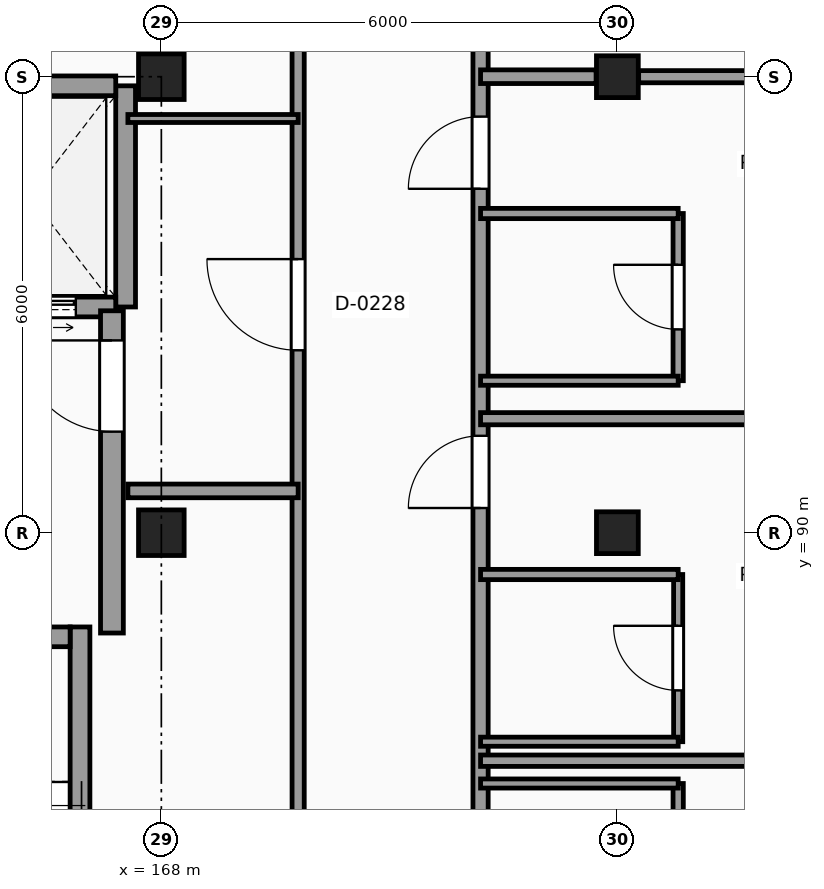
"""IFC4 building model, lengths in metres.
Left out: names, types, materials, properties, quantities, classifications, styles, units other than length and angle.
Written with IfcOpenShell. Run it as: python <this file> out.ifc"""

import sys

from ifc_helpers import new_model, si_unit, direction, frame, frame_2d, origin, origin_2d, place, context, subcontext, project, spatial, rectangle, extrude, element, fill, save


model = new_model("IFC4")
c1 = context("Model", 3, precision=1e-05, world=origin(), true_north=direction((0.0, 1.0)))
c2 = subcontext(c1, "Body", "Model", "MODEL_VIEW")
j1 = project(units=[si_unit("LENGTHUNIT", "METRE"), si_unit("PLANEANGLEUNIT", "RADIAN")], contexts=[c1])
p1 = place(None, origin())
s1 = spatial("IfcSite", under=j1, at=p1, CompositionType="ELEMENT")
p2 = place(p1, origin())
s2 = spatial("IfcBuilding", under=s1, at=p2, CompositionType="ELEMENT")
p3 = place(p2, frame((0.0, 0.0, 28.2)))
s3 = spatial("IfcBuildingStorey", under=s2, at=p3, CompositionType="ELEMENT", Elevation=28.2)
for number, where, z_axis, x_axis in (
    (1, (168.0, 90.0, 0.0), (0.0, 0.0, 1.0), (1.0, 0.0, 0.0)),
    (2, (168.0, 96.0, 0.0), (0.0, 0.0, 1.0), (1.0, 0.0, 0.0)),
):
    element("IfcColumn", number, at=place(p3, frame(where, z_axis=z_axis, x_axis=x_axis)), inside=s3, PredefinedType="COLUMN", context=c2, shape_type="SweptSolid", body=[
        extrude(rectangle(XDim=0.6, YDim=0.6, at=origin_2d()), origin(), (0.0, 0.0, 1.0), 3.3),
    ])
for number, where, z_axis, x_axis in (
    (3, (174.0, 90.0, 0.0), (0.0, 0.0, 1.0), (1.0, 0.0, 0.0)),
    (4, (174.0, 96.0, 0.0), (0.0, 0.0, 1.0), (1.0, 0.0, 0.0)),
):
    element("IfcColumn", number, at=place(p3, frame(where, z_axis=z_axis, x_axis=x_axis)), inside=s3, PredefinedType="COLUMN", context=c2, shape_type="SweptSolid", body=[
        extrude(rectangle(XDim=0.55, YDim=0.55, at=origin_2d()), origin(), (0.0, 0.0, 1.0), 3.3),
    ])
p4 = place(p3, frame((166.93, 78.04, 0.0), z_axis=(0.0, 0.0, 1.0), x_axis=(0.0, 1.0, 0.0)))
e5 = element("IfcWall", 5, at=p4, inside=s3, PredefinedType="SHEAR", context=c2, shape_type="SweptSolid", body=[
    extrude(rectangle(XDim=10.72, YDim=0.26, at=frame_2d((5.36, 0.0))), origin(), (0.0, 0.0, 1.0), 3.3),
])
p5 = place(p3, frame((163.2, 88.63, 0.0), z_axis=(0.0, 0.0, 1.0), x_axis=(1.0, 0.0, 0.0)))
e6 = element("IfcWall", 6, at=p5, inside=s3, PredefinedType="SHEAR", context=c2, shape_type="SweptSolid", body=[
    extrude(rectangle(XDim=3.6, YDim=0.26, at=frame_2d((1.8, 0.0))), origin(), (0.0, 0.0, 1.0), 3.3),
])
p6 = place(p5, frame((1.25, 0.0, 0.0)))
e7 = element("IfcOpeningElement", 7, at=p6, cuts=e6, PredefinedType="OPENING", context=c2, shape_type="SweptSolid", body=[
    extrude(rectangle(XDim=1.1, YDim=2.15, at=frame_2d((0.55, 1.075))), frame((0.0, 0.14, 0.0), z_axis=(0.0, -1.0, 0.0), x_axis=(1.0, 0.0, 0.0)), (0.0, 0.0, 1.0), 0.28),
])
p7 = place(p3, frame((167.53, 92.97, 0.0), z_axis=(0.0, 0.0, 1.0), x_axis=(0.0, 1.0, 0.0)))
e8 = element("IfcWall", 8, at=p7, inside=s3, PredefinedType="SHEAR", context=c2, shape_type="SweptSolid", body=[
    extrude(rectangle(XDim=2.91, YDim=0.26, at=frame_2d((1.455, 0.0))), origin(), (0.0, 0.0, 1.0), 3.3),
])
p8 = place(p3, frame((165.15, 95.88, 0.0), z_axis=(0.0, 0.0, 1.0), x_axis=(1.0, 0.0, 0.0)))
e9 = element("IfcWall", 9, at=p8, inside=s3, PredefinedType="SHEAR", context=c2, shape_type="SweptSolid", body=[
    extrude(rectangle(XDim=2.25, YDim=0.26, at=frame_2d((1.125, 0.0))), origin(), (0.0, 0.0, 1.0), 3.3),
])
p9 = place(p3, frame((165.15, 92.97, 0.0), z_axis=(0.0, 0.0, 1.0), x_axis=(1.0, 0.0, 0.0)))
e10 = element("IfcWall", 10, at=p9, inside=s3, PredefinedType="SHEAR", context=c2, shape_type="SweptSolid", body=[
    extrude(rectangle(XDim=2.25, YDim=0.26, at=frame_2d((1.125, 0.0))), origin(), (0.0, 0.0, 1.0), 3.3),
])
p10 = place(p9, frame((0.525, 0.0, 0.0)))
e11 = element("IfcOpeningElement", 11, at=p10, cuts=e10, PredefinedType="OPENING", context=c2, shape_type="SweptSolid", body=[
    extrude(rectangle(XDim=1.2, YDim=2.25, at=frame_2d((0.6, 1.125))), frame((0.0, 0.14, 0.0), z_axis=(0.0, -1.0, 0.0), x_axis=(1.0, 0.0, 0.0)), (0.0, 0.0, 1.0), 0.28),
])
p11 = place(p3, frame((167.35, 88.68, 0.0), z_axis=(0.0, 0.0, 1.0), x_axis=(0.0, 1.0, 0.0)))
e12 = element("IfcWall", 12, at=p11, inside=s3, PredefinedType="SHEAR", context=c2, shape_type="SweptSolid", body=[
    extrude(rectangle(XDim=4.24, YDim=0.3, at=frame_2d((2.12, 0.0))), origin(), (0.0, 0.0, 1.0), 3.3),
])
p12 = place(p11, frame((2.65, 0.0, 0.0)))
e13 = element("IfcOpeningElement", 13, at=p12, cuts=e12, PredefinedType="OPENING", context=c2, shape_type="SweptSolid", body=[
    extrude(rectangle(XDim=1.2, YDim=2.2, at=frame_2d((0.6, 1.1))), frame((0.0, 0.16, 0.0), z_axis=(0.0, -1.0, 0.0), x_axis=(1.0, 0.0, 0.0)), (0.0, 0.0, 1.0), 0.32),
])
p13 = place(p3, frame((169.8, 42.275, 0.0), z_axis=(0.0, 0.0, 1.0), x_axis=(0.0, 1.0, 0.0)))
e14 = element("IfcWall", 14, at=p13, inside=s3, PredefinedType="PARTITIONING", context=c2, shape_type="SweptSolid", body=[
    extrude(rectangle(XDim=65.545, YDim=0.16, at=frame_2d((32.772, 0.0))), origin(), (0.0, 0.0, 1.0), 3.08),
])
p14 = place(p13, frame((50.125, 0.0, 0.0)))
e15 = element("IfcOpeningElement", 15, at=p14, cuts=e14, PredefinedType="OPENING", context=c2, shape_type="SweptSolid", body=[
    extrude(rectangle(XDim=1.2, YDim=2.2, at=frame_2d((0.6, 1.1))), frame((0.0, 0.09, 0.0), z_axis=(0.0, -1.0, 0.0), x_axis=(1.0, 0.0, 0.0)), (0.0, 0.0, 1.0), 0.18),
])
p15 = place(p13, frame((0.4, 0.0, 0.0)))
e16 = element("IfcOpeningElement", 16, at=p15, cuts=e14, PredefinedType="OPENING", context=c2, shape_type="SweptSolid", body=[
    extrude(rectangle(XDim=0.95, YDim=2.1, at=frame_2d((0.475, 1.05))), frame((0.0, 0.09, 0.0), z_axis=(0.0, -1.0, 0.0), x_axis=(1.0, 0.0, 0.0)), (0.0, 0.0, 1.0), 0.18),
])
p16 = place(p13, frame((6.45, 0.0, 0.0)))
e17 = element("IfcOpeningElement", 17, at=p16, cuts=e14, PredefinedType="OPENING", context=c2, shape_type="SweptSolid", body=[
    extrude(rectangle(XDim=0.95, YDim=2.1, at=frame_2d((0.475, 1.05))), frame((0.0, 0.09, 0.0), z_axis=(0.0, -1.0, 0.0), x_axis=(1.0, 0.0, 0.0)), (0.0, 0.0, 1.0), 0.18),
])
p17 = place(p13, frame((12.45, 0.0, 0.0)))
e18 = element("IfcOpeningElement", 18, at=p17, cuts=e14, PredefinedType="OPENING", context=c2, shape_type="SweptSolid", body=[
    extrude(rectangle(XDim=0.95, YDim=2.1, at=frame_2d((0.475, 1.05))), frame((0.0, 0.09, 0.0), z_axis=(0.0, -1.0, 0.0), x_axis=(1.0, 0.0, 0.0)), (0.0, 0.0, 1.0), 0.18),
])
p18 = place(p13, frame((18.45, 0.0, 0.0)))
e19 = element("IfcOpeningElement", 19, at=p18, cuts=e14, PredefinedType="OPENING", context=c2, shape_type="SweptSolid", body=[
    extrude(rectangle(XDim=0.95, YDim=2.1, at=frame_2d((0.475, 1.05))), frame((0.0, 0.09, 0.0), z_axis=(0.0, -1.0, 0.0), x_axis=(1.0, 0.0, 0.0)), (0.0, 0.0, 1.0), 0.18),
])
p19 = place(p13, frame((24.45, 0.0, 0.0)))
e20 = element("IfcOpeningElement", 20, at=p19, cuts=e14, PredefinedType="OPENING", context=c2, shape_type="SweptSolid", body=[
    extrude(rectangle(XDim=0.95, YDim=2.1, at=frame_2d((0.475, 1.05))), frame((0.0, 0.09, 0.0), z_axis=(0.0, -1.0, 0.0), x_axis=(1.0, 0.0, 0.0)), (0.0, 0.0, 1.0), 0.18),
])
p20 = place(p13, frame((30.45, 0.0, 0.0)))
e21 = element("IfcOpeningElement", 21, at=p20, cuts=e14, PredefinedType="OPENING", context=c2, shape_type="SweptSolid", body=[
    extrude(rectangle(XDim=0.95, YDim=2.1, at=frame_2d((0.475, 1.05))), frame((0.0, 0.09, 0.0), z_axis=(0.0, -1.0, 0.0), x_axis=(1.0, 0.0, 0.0)), (0.0, 0.0, 1.0), 0.18),
])
p21 = place(p13, frame((54.45, 0.0, 0.0)))
e22 = element("IfcOpeningElement", 22, at=p21, cuts=e14, PredefinedType="OPENING", context=c2, shape_type="SweptSolid", body=[
    extrude(rectangle(XDim=0.95, YDim=2.1, at=frame_2d((0.475, 1.05))), frame((0.0, 0.09, 0.0), z_axis=(0.0, -1.0, 0.0), x_axis=(1.0, 0.0, 0.0)), (0.0, 0.0, 1.0), 0.18),
])
p22 = place(p13, frame((60.45, 0.0, 0.0)))
e23 = element("IfcOpeningElement", 23, at=p22, cuts=e14, PredefinedType="OPENING", context=c2, shape_type="SweptSolid", body=[
    extrude(rectangle(XDim=0.95, YDim=2.1, at=frame_2d((0.475, 1.05))), frame((0.0, 0.09, 0.0), z_axis=(0.0, -1.0, 0.0), x_axis=(1.0, 0.0, 0.0)), (0.0, 0.0, 1.0), 0.18),
])
p23 = place(p3, frame((172.2, 42.275, 0.0), z_axis=(0.0, 0.0, 1.0), x_axis=(0.0, 1.0, 0.0)))
e24 = element("IfcWall", 24, at=p23, inside=s3, PredefinedType="PARTITIONING", context=c2, shape_type="SweptSolid", body=[
    extrude(rectangle(XDim=65.545, YDim=0.2, at=frame_2d((32.772, 0.0))), origin(), (0.0, 0.0, 1.0), 3.08),
])
p24 = place(p23, frame((0.4, 0.0, 0.0)))
e25 = element("IfcOpeningElement", 25, at=p24, cuts=e24, PredefinedType="OPENING", context=c2, shape_type="SweptSolid", body=[
    extrude(rectangle(XDim=0.95, YDim=2.1, at=frame_2d((0.475, 1.05))), frame((0.0, 0.11, 0.0), z_axis=(0.0, -1.0, 0.0), x_axis=(1.0, 0.0, 0.0)), (0.0, 0.0, 1.0), 0.22),
])
p25 = place(p23, frame((4.85, 0.0, 0.0)))
e26 = element("IfcOpeningElement", 26, at=p25, cuts=e24, PredefinedType="OPENING", context=c2, shape_type="SweptSolid", body=[
    extrude(rectangle(XDim=0.95, YDim=2.1, at=frame_2d((0.475, 1.05))), frame((0.0, 0.11, 0.0), z_axis=(0.0, -1.0, 0.0), x_axis=(1.0, 0.0, 0.0)), (0.0, 0.0, 1.0), 0.22),
])
p26 = place(p23, frame((9.35, 0.0, 0.0)))
e27 = element("IfcOpeningElement", 27, at=p26, cuts=e24, PredefinedType="OPENING", context=c2, shape_type="SweptSolid", body=[
    extrude(rectangle(XDim=0.95, YDim=2.1, at=frame_2d((0.475, 1.05))), frame((0.0, 0.11, 0.0), z_axis=(0.0, -1.0, 0.0), x_axis=(1.0, 0.0, 0.0)), (0.0, 0.0, 1.0), 0.22),
])
p27 = place(p23, frame((18.45, 0.0, 0.0)))
e28 = element("IfcOpeningElement", 28, at=p27, cuts=e24, PredefinedType="OPENING", context=c2, shape_type="SweptSolid", body=[
    extrude(rectangle(XDim=0.95, YDim=2.1, at=frame_2d((0.475, 1.05))), frame((0.0, 0.11, 0.0), z_axis=(0.0, -1.0, 0.0), x_axis=(1.0, 0.0, 0.0)), (0.0, 0.0, 1.0), 0.22),
])
p28 = place(p23, frame((22.85, 0.0, 0.0)))
e29 = element("IfcOpeningElement", 29, at=p28, cuts=e24, PredefinedType="OPENING", context=c2, shape_type="SweptSolid", body=[
    extrude(rectangle(XDim=0.95, YDim=2.1, at=frame_2d((0.475, 1.05))), frame((0.0, 0.11, 0.0), z_axis=(0.0, -1.0, 0.0), x_axis=(1.0, 0.0, 0.0)), (0.0, 0.0, 1.0), 0.22),
])
p29 = place(p23, frame((30.05, 0.0, 0.0)))
e30 = element("IfcOpeningElement", 30, at=p29, cuts=e24, PredefinedType="OPENING", context=c2, shape_type="SweptSolid", body=[
    extrude(rectangle(XDim=0.95, YDim=2.1, at=frame_2d((0.475, 1.05))), frame((0.0, 0.11, 0.0), z_axis=(0.0, -1.0, 0.0), x_axis=(1.0, 0.0, 0.0)), (0.0, 0.0, 1.0), 0.22),
])
p30 = place(p23, frame((38.3, 0.0, 0.0)))
e31 = element("IfcOpeningElement", 31, at=p30, cuts=e24, PredefinedType="OPENING", context=c2, shape_type="SweptSolid", body=[
    extrude(rectangle(XDim=0.95, YDim=2.1, at=frame_2d((0.475, 1.05))), frame((0.0, 0.11, 0.0), z_axis=(0.0, -1.0, 0.0), x_axis=(1.0, 0.0, 0.0)), (0.0, 0.0, 1.0), 0.22),
])
p31 = place(p23, frame((40.85, 0.0, 0.0)))
e32 = element("IfcOpeningElement", 32, at=p31, cuts=e24, PredefinedType="OPENING", context=c2, shape_type="SweptSolid", body=[
    extrude(rectangle(XDim=0.95, YDim=2.1, at=frame_2d((0.475, 1.05))), frame((0.0, 0.11, 0.0), z_axis=(0.0, -1.0, 0.0), x_axis=(1.0, 0.0, 0.0)), (0.0, 0.0, 1.0), 0.22),
])
p32 = place(p23, frame((48.05, 0.0, 0.0)))
e33 = element("IfcOpeningElement", 33, at=p32, cuts=e24, PredefinedType="OPENING", context=c2, shape_type="SweptSolid", body=[
    extrude(rectangle(XDim=0.95, YDim=2.1, at=frame_2d((0.475, 1.05))), frame((0.0, 0.11, 0.0), z_axis=(0.0, -1.0, 0.0), x_axis=(1.0, 0.0, 0.0)), (0.0, 0.0, 1.0), 0.22),
])
p33 = place(p23, frame((52.25, 0.0, 0.0)))
e34 = element("IfcOpeningElement", 34, at=p33, cuts=e24, PredefinedType="OPENING", context=c2, shape_type="SweptSolid", body=[
    extrude(rectangle(XDim=0.95, YDim=2.1, at=frame_2d((0.475, 1.05))), frame((0.0, 0.11, 0.0), z_axis=(0.0, -1.0, 0.0), x_axis=(1.0, 0.0, 0.0)), (0.0, 0.0, 1.0), 0.22),
])
p34 = place(p23, frame((54.45, 0.0, 0.0)))
e35 = element("IfcOpeningElement", 35, at=p34, cuts=e24, PredefinedType="OPENING", context=c2, shape_type="SweptSolid", body=[
    extrude(rectangle(XDim=0.95, YDim=2.1, at=frame_2d((0.475, 1.05))), frame((0.0, 0.11, 0.0), z_axis=(0.0, -1.0, 0.0), x_axis=(1.0, 0.0, 0.0)), (0.0, 0.0, 1.0), 0.22),
])
p35 = place(p23, frame((60.45, 0.0, 0.0)))
e36 = element("IfcOpeningElement", 36, at=p35, cuts=e24, PredefinedType="OPENING", context=c2, shape_type="SweptSolid", body=[
    extrude(rectangle(XDim=0.95, YDim=2.1, at=frame_2d((0.475, 1.05))), frame((0.0, 0.11, 0.0), z_axis=(0.0, -1.0, 0.0), x_axis=(1.0, 0.0, 0.0)), (0.0, 0.0, 1.0), 0.22),
])
p36 = place(p3, frame((174.8, 84.5, 0.0), z_axis=(0.0, 0.0, 1.0), x_axis=(0.0, 1.0, 0.0)))
e37 = element("IfcWall", 37, at=p36, inside=s3, PredefinedType="PARTITIONING", context=c2, shape_type="SweptSolid", body=[
    extrude(rectangle(XDim=2.2, YDim=0.135, at=frame_2d((1.1, 0.0))), origin(), (0.0, 0.0, 1.0), 3.08),
])
p37 = place(p36, frame((0.675, 0.0, 0.0)))
e38 = element("IfcOpeningElement", 38, at=p37, cuts=e37, PredefinedType="OPENING", context=c2, shape_type="SweptSolid", body=[
    extrude(rectangle(XDim=0.85, YDim=2.1, at=frame_2d((0.425, 1.05))), frame((0.0, 0.078, 0.0), z_axis=(0.0, -1.0, 0.0), x_axis=(1.0, 0.0, 0.0)), (0.0, 0.0, 1.0), 0.155),
])
p38 = place(p3, frame((174.8, 87.25, 0.0), z_axis=(0.0, 0.0, 1.0), x_axis=(0.0, 1.0, 0.0)))
e39 = element("IfcWall", 39, at=p38, inside=s3, PredefinedType="PARTITIONING", context=c2, shape_type="SweptSolid", body=[
    extrude(rectangle(XDim=2.2, YDim=0.12, at=frame_2d((1.1, 0.0))), origin(), (0.0, 0.0, 1.0), 3.08),
])
p39 = place(p38, frame((0.675, 0.0, 0.0)))
e40 = element("IfcOpeningElement", 40, at=p39, cuts=e39, PredefinedType="OPENING", context=c2, shape_type="SweptSolid", body=[
    extrude(rectangle(XDim=0.85, YDim=2.1, at=frame_2d((0.425, 1.05))), frame((0.0, 0.07, 0.0), z_axis=(0.0, -1.0, 0.0), x_axis=(1.0, 0.0, 0.0)), (0.0, 0.0, 1.0), 0.14),
])
p40 = place(p3, frame((174.8, 92.0, 0.0), z_axis=(0.0, 0.0, 1.0), x_axis=(0.0, 1.0, 0.0)))
e41 = element("IfcWall", 41, at=p40, inside=s3, PredefinedType="PARTITIONING", context=c2, shape_type="SweptSolid", body=[
    extrude(rectangle(XDim=2.2, YDim=0.135, at=frame_2d((1.1, 0.0))), origin(), (0.0, 0.0, 1.0), 3.08),
])
p41 = place(p40, frame((0.675, 0.0, 0.0)))
e42 = element("IfcOpeningElement", 42, at=p41, cuts=e41, PredefinedType="OPENING", context=c2, shape_type="SweptSolid", body=[
    extrude(rectangle(XDim=0.85, YDim=2.1, at=frame_2d((0.425, 1.05))), frame((0.0, 0.078, 0.0), z_axis=(0.0, -1.0, 0.0), x_axis=(1.0, 0.0, 0.0)), (0.0, 0.0, 1.0), 0.155),
])
p42 = place(p3, frame((172.2, 86.7, 0.0), z_axis=(0.0, 0.0, 1.0), x_axis=(1.0, 0.0, 0.0)))
e43 = element("IfcWall", 43, at=p42, inside=s3, PredefinedType="PARTITIONING", context=c2, shape_type="SweptSolid", body=[
    extrude(rectangle(XDim=2.6, YDim=0.12, at=frame_2d((1.3, 0.0))), origin(), (0.0, 0.0, 1.0), 3.08),
])
p43 = place(p3, frame((172.2, 87.0, 0.0), z_axis=(0.0, 0.0, 1.0), x_axis=(1.0, 0.0, 0.0)))
e44 = element("IfcWall", 44, at=p43, inside=s3, PredefinedType="PARTITIONING", context=c2, shape_type="SweptSolid", body=[
    extrude(rectangle(XDim=7.585, YDim=0.15, at=frame_2d((3.792, 0.0))), origin(), (0.0, 0.0, 1.0), 3.08),
])
p44 = place(p3, frame((172.2, 87.25, 0.0), z_axis=(0.0, 0.0, 1.0), x_axis=(1.0, 0.0, 0.0)))
e45 = element("IfcWall", 45, at=p44, inside=s3, PredefinedType="PARTITIONING", context=c2, shape_type="SweptSolid", body=[
    extrude(rectangle(XDim=2.6, YDim=0.12, at=frame_2d((1.3, 0.0))), origin(), (0.0, 0.0, 1.0), 3.08),
])
p45 = place(p3, frame((172.2, 89.45, 0.0), z_axis=(0.0, 0.0, 1.0), x_axis=(1.0, 0.0, 0.0)))
e46 = element("IfcWall", 46, at=p45, inside=s3, PredefinedType="PARTITIONING", context=c2, shape_type="SweptSolid", body=[
    extrude(rectangle(XDim=2.6, YDim=0.135, at=frame_2d((1.3, 0.0))), origin(), (0.0, 0.0, 1.0), 3.08),
])
p46 = place(p3, frame((167.56, 90.55, 0.0), z_axis=(0.0, 0.0, 1.0), x_axis=(1.0, 0.0, 0.0)))
e47 = element("IfcWall", 47, at=p46, inside=s3, PredefinedType="PARTITIONING", context=c2, shape_type="SweptSolid", body=[
    extrude(rectangle(XDim=2.24, YDim=0.18, at=frame_2d((1.12, 0.0))), origin(), (0.0, 0.0, 1.0), 3.08),
])
p47 = place(p3, frame((172.2, 91.5, 0.0), z_axis=(0.0, 0.0, 1.0), x_axis=(1.0, 0.0, 0.0)))
e48 = element("IfcWall", 48, at=p47, inside=s3, PredefinedType="PARTITIONING", context=c2, shape_type="SweptSolid", body=[
    extrude(rectangle(XDim=7.525, YDim=0.16, at=frame_2d((3.763, 0.0))), origin(), (0.0, 0.0, 1.0), 3.08),
])
p48 = place(p3, frame((172.2, 92.0, 0.0), z_axis=(0.0, 0.0, 1.0), x_axis=(1.0, 0.0, 0.0)))
e49 = element("IfcWall", 49, at=p48, inside=s3, PredefinedType="PARTITIONING", context=c2, shape_type="SweptSolid", body=[
    extrude(rectangle(XDim=2.6, YDim=0.12, at=frame_2d((1.3, 0.0))), origin(), (0.0, 0.0, 1.0), 3.08),
])
p49 = place(p3, frame((172.2, 94.2, 0.0), z_axis=(0.0, 0.0, 1.0), x_axis=(1.0, 0.0, 0.0)))
e50 = element("IfcWall", 50, at=p49, inside=s3, PredefinedType="PARTITIONING", context=c2, shape_type="SweptSolid", body=[
    extrude(rectangle(XDim=2.6, YDim=0.135, at=frame_2d((1.3, 0.0))), origin(), (0.0, 0.0, 1.0), 3.08),
])
p50 = place(p3, frame((167.56, 95.45, 0.0), z_axis=(0.0, 0.0, 1.0), x_axis=(1.0, 0.0, 0.0)))
e51 = element("IfcWall", 51, at=p50, inside=s3, PredefinedType="PARTITIONING", context=c2, shape_type="SweptSolid", body=[
    extrude(rectangle(XDim=2.24, YDim=0.105, at=frame_2d((1.12, 0.0))), origin(), (0.0, 0.0, 1.0), 3.08),
])
p51 = place(p3, frame((172.2, 96.0, 0.0), z_axis=(0.0, 0.0, 1.0), x_axis=(1.0, 0.0, 0.0)))
e52 = element("IfcWall", 52, at=p51, inside=s3, PredefinedType="PARTITIONING", context=c2, shape_type="SweptSolid", body=[
    extrude(rectangle(XDim=1.52, YDim=0.18, at=frame_2d((0.76, 0.0))), origin(), (0.0, 0.0, 1.0), 2.28),
])
p52 = place(p3, frame((174.28, 96.0, 0.0), z_axis=(0.0, 0.0, 1.0), x_axis=(1.0, 0.0, 0.0)))
e53 = element("IfcWall", 53, at=p52, inside=s3, PredefinedType="PARTITIONING", context=c2, shape_type="SweptSolid", body=[
    extrude(rectangle(XDim=5.415, YDim=0.16, at=frame_2d((2.708, 0.0))), origin(), (0.0, 0.0, 1.0), 2.38),
])
p53 = place(p10, origin())
e54 = element("IfcDoor", 54, at=p53, inside=s3, OperationType="DOUBLE_DOOR_SLIDING", PredefinedType="DOOR", context=c2, shape_type="SweptSolid", body=[
    extrude(rectangle(XDim=1.2, YDim=2.25, at=frame_2d((0.6, 1.125))), frame((0.0, 0.025, 0.0), z_axis=(0.0, -1.0, 0.0), x_axis=(1.0, 0.0, 0.0)), (0.0, 0.0, 1.0), 0.05),
])
fill(e11, e54)
p54 = place(p12, origin())
e55 = element("IfcDoor", 55, at=p54, inside=s3, OperationType="SINGLE_SWING_RIGHT", PredefinedType="DOOR", context=c2, shape_type="SweptSolid", body=[
    extrude(rectangle(XDim=1.2, YDim=2.2, at=frame_2d((0.6, 1.1))), frame((0.0, 0.025, 0.0), z_axis=(0.0, -1.0, 0.0), x_axis=(1.0, 0.0, 0.0)), (0.0, 0.0, 1.0), 0.05),
])
fill(e13, e55)
p55 = place(p14, origin())
e56 = element("IfcDoor", 56, at=p55, inside=s3, OperationType="SINGLE_SWING_RIGHT", PredefinedType="DOOR", context=c2, shape_type="SweptSolid", body=[
    extrude(rectangle(XDim=1.2, YDim=2.2, at=frame_2d((0.6, 1.1))), frame((0.0, 0.025, 0.0), z_axis=(0.0, -1.0, 0.0), x_axis=(1.0, 0.0, 0.0)), (0.0, 0.0, 1.0), 0.05),
])
fill(e15, e56)
p56 = place(p39, origin())
e57 = element("IfcDoor", 57, at=p56, inside=s3, OperationType="SINGLE_SWING_RIGHT", PredefinedType="DOOR", context=c2, shape_type="SweptSolid", body=[
    extrude(rectangle(XDim=0.85, YDim=2.1, at=frame_2d((0.425, 1.05))), frame((0.0, 0.025, 0.0), z_axis=(0.0, -1.0, 0.0), x_axis=(1.0, 0.0, 0.0)), (0.0, 0.0, 1.0), 0.05),
])
fill(e40, e57)
p57 = place(p32, origin())
e58 = element("IfcDoor", 58, at=p57, inside=s3, OperationType="SINGLE_SWING_LEFT", PredefinedType="DOOR", context=c2, shape_type="SweptSolid", body=[
    extrude(rectangle(XDim=0.95, YDim=2.1, at=frame_2d((0.475, 1.05))), frame((0.0, 0.025, 0.0), z_axis=(0.0, -1.0, 0.0), x_axis=(1.0, 0.0, 0.0)), (0.0, 0.0, 1.0), 0.05),
])
fill(e33, e58)
p58 = place(p41, origin())
e59 = element("IfcDoor", 59, at=p58, inside=s3, OperationType="SINGLE_SWING_RIGHT", PredefinedType="DOOR", context=c2, shape_type="SweptSolid", body=[
    extrude(rectangle(XDim=0.85, YDim=2.1, at=frame_2d((0.425, 1.05))), frame((0.0, 0.025, 0.0), z_axis=(0.0, -1.0, 0.0), x_axis=(1.0, 0.0, 0.0)), (0.0, 0.0, 1.0), 0.05),
])
fill(e42, e59)
p59 = place(p33, origin())
e60 = element("IfcDoor", 60, at=p59, inside=s3, OperationType="SINGLE_SWING_LEFT", PredefinedType="DOOR", context=c2, shape_type="SweptSolid", body=[
    extrude(rectangle(XDim=0.95, YDim=2.1, at=frame_2d((0.475, 1.05))), frame((0.0, 0.025, 0.0), z_axis=(0.0, -1.0, 0.0), x_axis=(1.0, 0.0, 0.0)), (0.0, 0.0, 1.0), 0.05),
])
fill(e34, e60)
save(model, sys.argv[1])
